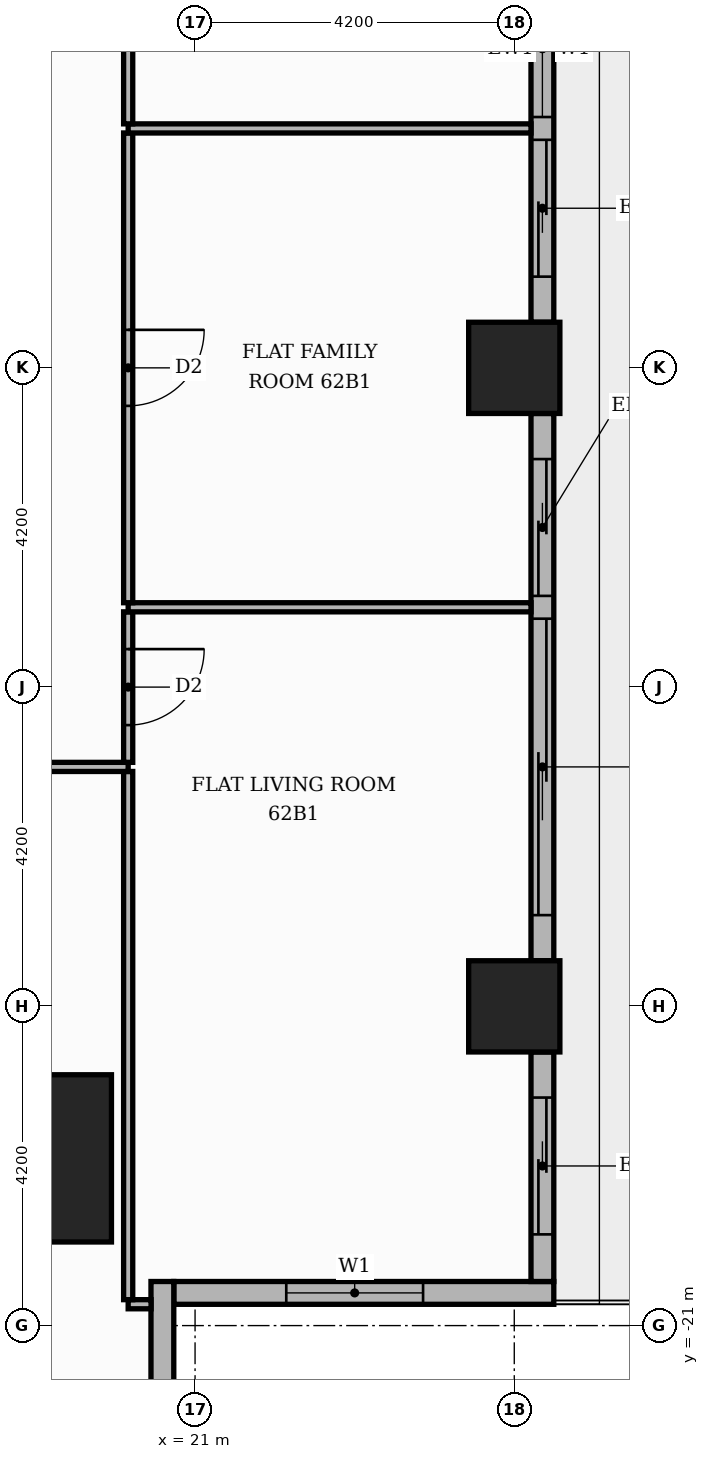
"""IFC4 building model, lengths in metres.
Left out: names, types, materials, properties, quantities, classifications, styles, units other than length and angle.
Written with IfcOpenShell. Run it as: python <this file> out.ifc"""

import sys

from ifc_helpers import new_model, si_unit, direction, frame, frame_2d, origin, origin_2d, place, context, subcontext, project, spatial, rectangle, extrude, element, fill, save


model = new_model("IFC4")
c1 = context("Model", 3, precision=1e-05, world=origin(), true_north=direction((0.0, 1.0)))
c2 = subcontext(c1, "Body", "Model", "MODEL_VIEW")
j1 = project(units=[si_unit("LENGTHUNIT", "METRE"), si_unit("PLANEANGLEUNIT", "RADIAN")], contexts=[c1])
p1 = place(None, origin())
s1 = spatial("IfcSite", under=j1, at=p1, CompositionType="ELEMENT")
p2 = place(p1, origin())
s2 = spatial("IfcBuilding", under=s1, at=p2, CompositionType="ELEMENT")
p3 = place(p2, frame((0.0, 0.0, 260.1)))
s3 = spatial("IfcBuildingStorey", under=s2, at=p3, CompositionType="ELEMENT", Elevation=260.1)
p4 = place(p3, frame((18.8, -18.8, 0.0), z_axis=(0.0, 0.0, 1.0), x_axis=(1.0, 0.0, 0.0)))
e1 = element("IfcColumn", 1, at=p4, inside=s3, PredefinedType="COLUMN", context=c2, shape_type="SweptSolid", body=[
    extrude(rectangle(XDim=2.2, YDim=2.2, at=origin_2d()), origin(), (0.0, 0.0, 1.0), 3.9),
])
for number, where, z_axis, x_axis in (
    (2, (25.2, -8.4, 0.0), (0.0, 0.0, 1.0), (1.0, 0.0, 0.0)),
    (3, (25.2, -16.8, 0.0), (0.0, 0.0, 1.0), (1.0, 0.0, 0.0)),
):
    element("IfcColumn", number, at=place(p3, frame(where, z_axis=z_axis, x_axis=x_axis)), inside=s3, PredefinedType="COLUMN", context=c2, shape_type="SweptSolid", body=[
        extrude(rectangle(XDim=1.2, YDim=1.2, at=origin_2d()), origin(), (0.0, 0.0, 1.0), 3.9),
    ])
p5 = place(p3, frame((20.72, -20.57, 0.0), z_axis=(0.0, 0.0, 1.0), x_axis=(1.0, 0.0, 0.0)))
e4 = element("IfcWall", 4, at=p5, inside=s3, PredefinedType="STANDARD", context=c2, shape_type="SweptSolid", body=[
    extrude(rectangle(XDim=5.0, YDim=0.3, at=frame_2d((2.5, 0.0))), origin(), (0.0, 0.0, 1.0), 3.48),
])
p6 = place(p5, frame((1.48, 0.0, 0.9)))
e5 = element("IfcOpeningElement", 5, at=p6, cuts=e4, PredefinedType="OPENING", context=c2, shape_type="SweptSolid", body=[
    extrude(rectangle(XDim=1.8, YDim=2.1, at=frame_2d((0.9, 1.05))), frame((0.0, 0.16, 0.0), z_axis=(0.0, -1.0, 0.0), x_axis=(1.0, 0.0, 0.0)), (0.0, 0.0, 1.0), 0.32),
])
p7 = place(p3, frame((25.57, -20.42, 0.0), z_axis=(0.0, 0.0, 1.0), x_axis=(0.0, 1.0, 0.0)))
e6 = element("IfcWall", 6, at=p7, inside=s3, PredefinedType="STANDARD", context=c2, shape_type="SweptSolid", body=[
    extrude(rectangle(XDim=3.02, YDim=0.3, at=frame_2d((1.51, 0.0))), origin(), (0.0, 0.0, 1.0), 3.48),
])
p8 = place(p7, frame((0.62, 0.0, 0.0)))
e7 = element("IfcOpeningElement", 7, at=p8, cuts=e6, PredefinedType="OPENING", context=c2, shape_type="SweptSolid", body=[
    extrude(rectangle(XDim=1.8, YDim=2.4, at=frame_2d((0.9, 1.2))), frame((0.0, 0.16, 0.0), z_axis=(0.0, -1.0, 0.0), x_axis=(1.0, 0.0, 0.0)), (0.0, 0.0, 1.0), 0.32),
])
p9 = place(p3, frame((25.57, -16.2, 0.0), z_axis=(0.0, 0.0, 1.0), x_axis=(0.0, 1.0, 0.0)))
e8 = element("IfcWall", 8, at=p9, inside=s3, PredefinedType="STANDARD", context=c2, shape_type="SweptSolid", body=[
    extrude(rectangle(XDim=7.2, YDim=0.3, at=frame_2d((3.6, 0.0))), origin(), (0.0, 0.0, 1.0), 3.48),
])
p10 = place(p9, frame((0.6, 0.0, 0.0)))
e9 = element("IfcOpeningElement", 9, at=p10, cuts=e8, PredefinedType="OPENING", context=c2, shape_type="SweptSolid", body=[
    extrude(rectangle(XDim=3.9, YDim=2.4, at=frame_2d((1.95, 1.2))), frame((0.0, 0.16, 0.0), z_axis=(0.0, -1.0, 0.0), x_axis=(1.0, 0.0, 0.0)), (0.0, 0.0, 1.0), 0.32),
])
p11 = place(p9, frame((4.8, 0.0, 0.0)))
e10 = element("IfcOpeningElement", 10, at=p11, cuts=e8, PredefinedType="OPENING", context=c2, shape_type="SweptSolid", body=[
    extrude(rectangle(XDim=1.8, YDim=2.4, at=frame_2d((0.9, 1.2))), frame((0.0, 0.16, 0.0), z_axis=(0.0, -1.0, 0.0), x_axis=(1.0, 0.0, 0.0)), (0.0, 0.0, 1.0), 0.32),
])
p12 = place(p3, frame((25.57, -7.8, 0.0), z_axis=(0.0, 0.0, 1.0), x_axis=(0.0, 1.0, 0.0)))
e11 = element("IfcWall", 11, at=p12, inside=s3, PredefinedType="STANDARD", context=c2, shape_type="SweptSolid", body=[
    extrude(rectangle(XDim=7.2, YDim=0.3, at=frame_2d((3.6, 0.0))), origin(), (0.0, 0.0, 1.0), 3.48),
])
p13 = place(p12, frame((0.6, 0.0, 0.0)))
e12 = element("IfcOpeningElement", 12, at=p13, cuts=e11, PredefinedType="OPENING", context=c2, shape_type="SweptSolid", body=[
    extrude(rectangle(XDim=1.8, YDim=2.4, at=frame_2d((0.9, 1.2))), frame((0.0, 0.16, 0.0), z_axis=(0.0, -1.0, 0.0), x_axis=(1.0, 0.0, 0.0)), (0.0, 0.0, 1.0), 0.32),
])
p14 = place(p12, frame((2.7, 0.0, 0.9)))
e13 = element("IfcOpeningElement", 13, at=p14, cuts=e11, PredefinedType="OPENING", context=c2, shape_type="SweptSolid", body=[
    extrude(rectangle(XDim=1.8, YDim=2.1, at=frame_2d((0.9, 1.05))), frame((0.0, 0.16, 0.0), z_axis=(0.0, -1.0, 0.0), x_axis=(1.0, 0.0, 0.0)), (0.0, 0.0, 1.0), 0.32),
])
p15 = place(p12, frame((4.8, 0.0, 0.0)))
e14 = element("IfcOpeningElement", 14, at=p15, cuts=e11, PredefinedType="OPENING", context=c2, shape_type="SweptSolid", body=[
    extrude(rectangle(XDim=1.8, YDim=2.4, at=frame_2d((0.9, 1.2))), frame((0.0, 0.16, 0.0), z_axis=(0.0, -1.0, 0.0), x_axis=(1.0, 0.0, 0.0)), (0.0, 0.0, 1.0), 0.32),
])
p16 = place(p3, frame((20.57, -25.42, 0.0), z_axis=(0.0, 0.0, 1.0), x_axis=(0.0, 1.0, 0.0)))
e15 = element("IfcWall", 15, at=p16, inside=s3, PredefinedType="STANDARD", context=c2, shape_type="SweptSolid", body=[
    extrude(rectangle(XDim=5.0, YDim=0.3, at=frame_2d((2.5, 0.0))), origin(), (0.0, 0.0, 1.0), 3.48),
])
p17 = place(p16, frame((1.42, 0.0, 0.9)))
e16 = element("IfcOpeningElement", 16, at=p17, cuts=e15, PredefinedType="OPENING", context=c2, shape_type="SweptSolid", body=[
    extrude(rectangle(XDim=1.8, YDim=2.1, at=frame_2d((0.9, 1.05))), frame((0.0, 0.16, 0.0), z_axis=(0.0, -1.0, 0.0), x_axis=(1.0, 0.0, 0.0)), (0.0, 0.0, 1.0), 0.32),
])
p18 = place(p3, frame((20.12, -20.719, 0.0), z_axis=(0.0, 0.0, 1.0), x_axis=(1.0, 0.0, 0.0)))
e17 = element("IfcWall", 17, at=p18, inside=s3, PredefinedType="PARTITIONING", context=c2, shape_type="SweptSolid", body=[
    extrude(rectangle(XDim=0.301, YDim=0.12, at=frame_2d((0.15, 0.0))), origin(), (0.0, 0.0, 1.0), 3.48),
])
p19 = place(p3, frame((20.12, -20.659, 0.0), z_axis=(0.0, 0.0, 1.0), x_axis=(0.0, 1.0, 0.0)))
e18 = element("IfcWall", 18, at=p19, inside=s3, PredefinedType="PARTITIONING", context=c2, shape_type="SweptSolid", body=[
    extrude(rectangle(XDim=6.949, YDim=0.12, at=frame_2d((3.475, 0.0))), origin(), (0.0, 0.0, 1.0), 3.48),
])
p20 = place(p3, frame((13.65, -13.65, 0.0), z_axis=(0.0, 0.0, 1.0), x_axis=(1.0, 0.0, 0.0)))
e19 = element("IfcWall", 19, at=p20, inside=s3, PredefinedType="PARTITIONING", context=c2, shape_type="SweptSolid", body=[
    extrude(rectangle(XDim=6.47, YDim=0.12, at=frame_2d((3.235, 0.0))), origin(), (0.0, 0.0, 1.0), 3.48),
])
p21 = place(p20, frame((2.785, 0.0, 0.0)))
e20 = element("IfcOpeningElement", 20, at=p21, cuts=e19, PredefinedType="OPENING", context=c2, shape_type="SweptSolid", body=[
    extrude(rectangle(XDim=0.9, YDim=2.1, at=frame_2d((0.45, 1.05))), frame((0.0, 0.07, 0.0), z_axis=(0.0, -1.0, 0.0), x_axis=(1.0, 0.0, 0.0)), (0.0, 0.0, 1.0), 0.14),
])
p22 = place(p3, frame((20.12, -13.59, 0.0), z_axis=(0.0, 0.0, 1.0), x_axis=(0.0, 1.0, 0.0)))
e21 = element("IfcWall", 21, at=p22, inside=s3, PredefinedType="PARTITIONING", context=c2, shape_type="SweptSolid", body=[
    extrude(rectangle(XDim=1.98, YDim=0.12, at=frame_2d((0.99, 0.0))), origin(), (0.0, 0.0, 1.0), 3.48),
])
p23 = place(p22, frame((0.49, 0.0, 0.0)))
e22 = element("IfcOpeningElement", 22, at=p23, cuts=e21, PredefinedType="OPENING", context=c2, shape_type="SweptSolid", body=[
    extrude(rectangle(XDim=1.0, YDim=2.1, at=frame_2d((0.5, 1.05))), frame((0.0, 0.07, 0.0), z_axis=(0.0, -1.0, 0.0), x_axis=(1.0, 0.0, 0.0)), (0.0, 0.0, 1.0), 0.14),
])
p24 = place(p3, frame((20.12, -11.55, 0.0), z_axis=(0.0, 0.0, 1.0), x_axis=(1.0, 0.0, 0.0)))
e23 = element("IfcWall", 23, at=p24, inside=s3, PredefinedType="PARTITIONING", context=c2, shape_type="SweptSolid", body=[
    extrude(rectangle(XDim=5.3, YDim=0.12, at=frame_2d((2.65, 0.0))), origin(), (0.0, 0.0, 1.0), 3.48),
])
p25 = place(p3, frame((20.12, -11.49, 0.0), z_axis=(0.0, 0.0, 1.0), x_axis=(0.0, 1.0, 0.0)))
e24 = element("IfcWall", 24, at=p25, inside=s3, PredefinedType="PARTITIONING", context=c2, shape_type="SweptSolid", body=[
    extrude(rectangle(XDim=6.18, YDim=0.12, at=frame_2d((3.09, 0.0))), origin(), (0.0, 0.0, 1.0), 3.48),
])
p26 = place(p25, frame((2.59, 0.0, 0.0)))
e25 = element("IfcOpeningElement", 25, at=p26, cuts=e24, PredefinedType="OPENING", context=c2, shape_type="SweptSolid", body=[
    extrude(rectangle(XDim=1.0, YDim=2.1, at=frame_2d((0.5, 1.05))), frame((0.0, 0.07, 0.0), z_axis=(0.0, -1.0, 0.0), x_axis=(1.0, 0.0, 0.0)), (0.0, 0.0, 1.0), 0.14),
])
p27 = place(p3, frame((20.12, -5.25, 0.0), z_axis=(0.0, 0.0, 1.0), x_axis=(1.0, 0.0, 0.0)))
e26 = element("IfcWall", 26, at=p27, inside=s3, PredefinedType="PARTITIONING", context=c2, shape_type="SweptSolid", body=[
    extrude(rectangle(XDim=5.3, YDim=0.12, at=frame_2d((2.65, 0.0))), origin(), (0.0, 0.0, 1.0), 3.48),
])
p28 = place(p3, frame((20.12, -5.19, 0.0), z_axis=(0.0, 0.0, 1.0), x_axis=(0.0, 1.0, 0.0)))
e27 = element("IfcWall", 27, at=p28, inside=s3, PredefinedType="PARTITIONING", context=c2, shape_type="SweptSolid", body=[
    extrude(rectangle(XDim=8.28, YDim=0.12, at=frame_2d((4.14, 0.0))), origin(), (0.0, 0.0, 1.0), 3.48),
])
p29 = place(p28, frame((3.69, 0.0, 0.0)))
e28 = element("IfcOpeningElement", 28, at=p29, cuts=e27, PredefinedType="OPENING", context=c2, shape_type="SweptSolid", body=[
    extrude(rectangle(XDim=0.9, YDim=2.1, at=frame_2d((0.45, 1.05))), frame((0.0, 0.07, 0.0), z_axis=(0.0, -1.0, 0.0), x_axis=(1.0, 0.0, 0.0)), (0.0, 0.0, 1.0), 0.14),
])
p30 = place(p6, origin())
e29 = element("IfcWindow", 29, at=p30, inside=s3, PartitioningType="SINGLE_PANEL", PredefinedType="WINDOW", context=c2, shape_type="SweptSolid", body=[
    extrude(rectangle(XDim=1.8, YDim=2.1, at=frame_2d((0.9, 1.05))), frame((0.0, 0.03, 0.0), z_axis=(0.0, -1.0, 0.0), x_axis=(1.0, 0.0, 0.0)), (0.0, 0.0, 1.0), 0.06),
])
fill(e5, e29)
p31 = place(p8, origin())
e30 = element("IfcDoor", 30, at=p31, inside=s3, OperationType="SLIDING_TO_RIGHT", PredefinedType="DOOR", context=c2, shape_type="SweptSolid", body=[
    extrude(rectangle(XDim=1.8, YDim=2.4, at=frame_2d((0.9, 1.2))), frame((0.0, 0.025, 0.0), z_axis=(0.0, -1.0, 0.0), x_axis=(1.0, 0.0, 0.0)), (0.0, 0.0, 1.0), 0.05),
])
fill(e7, e30)
p32 = place(p10, origin())
e31 = element("IfcDoor", 31, at=p32, inside=s3, OperationType="SLIDING_TO_LEFT", PredefinedType="DOOR", context=c2, shape_type="SweptSolid", body=[
    extrude(rectangle(XDim=3.9, YDim=2.4, at=frame_2d((1.95, 1.2))), frame((0.0, 0.025, 0.0), z_axis=(0.0, -1.0, 0.0), x_axis=(1.0, 0.0, 0.0)), (0.0, 0.0, 1.0), 0.05),
])
fill(e9, e31)
p33 = place(p11, origin())
e32 = element("IfcDoor", 32, at=p33, inside=s3, OperationType="SLIDING_TO_RIGHT", PredefinedType="DOOR", context=c2, shape_type="SweptSolid", body=[
    extrude(rectangle(XDim=1.8, YDim=2.4, at=frame_2d((0.9, 1.2))), frame((0.0, 0.025, 0.0), z_axis=(0.0, -1.0, 0.0), x_axis=(1.0, 0.0, 0.0)), (0.0, 0.0, 1.0), 0.05),
])
fill(e10, e32)
p34 = place(p13, origin())
e33 = element("IfcDoor", 33, at=p34, inside=s3, OperationType="SLIDING_TO_LEFT", PredefinedType="DOOR", context=c2, shape_type="SweptSolid", body=[
    extrude(rectangle(XDim=1.8, YDim=2.4, at=frame_2d((0.9, 1.2))), frame((0.0, 0.025, 0.0), z_axis=(0.0, -1.0, 0.0), x_axis=(1.0, 0.0, 0.0)), (0.0, 0.0, 1.0), 0.05),
])
fill(e12, e33)
p35 = place(p14, origin())
e34 = element("IfcWindow", 34, at=p35, inside=s3, PartitioningType="SINGLE_PANEL", PredefinedType="WINDOW", context=c2, shape_type="SweptSolid", body=[
    extrude(rectangle(XDim=1.8, YDim=2.1, at=frame_2d((0.9, 1.05))), frame((0.0, 0.03, 0.0), z_axis=(0.0, -1.0, 0.0), x_axis=(1.0, 0.0, 0.0)), (0.0, 0.0, 1.0), 0.06),
])
fill(e13, e34)
p36 = place(p23, frame((1.0, 0.0, 0.0), z_axis=(0.0, 0.0, 1.0), x_axis=(-1.0, 0.0, 0.0)))
e35 = element("IfcDoor", 35, at=p36, inside=s3, OperationType="SINGLE_SWING_RIGHT", PredefinedType="DOOR", context=c2, shape_type="SweptSolid", body=[
    extrude(rectangle(XDim=1.0, YDim=2.1, at=frame_2d((0.5, 1.05))), frame((0.0, 0.025, 0.0), z_axis=(0.0, -1.0, 0.0), x_axis=(1.0, 0.0, 0.0)), (0.0, 0.0, 1.0), 0.05),
])
fill(e22, e35)
p37 = place(p26, frame((1.0, 0.0, 0.0), z_axis=(0.0, 0.0, 1.0), x_axis=(-1.0, 0.0, 0.0)))
e36 = element("IfcDoor", 36, at=p37, inside=s3, OperationType="SINGLE_SWING_RIGHT", PredefinedType="DOOR", context=c2, shape_type="SweptSolid", body=[
    extrude(rectangle(XDim=1.0, YDim=2.1, at=frame_2d((0.5, 1.05))), frame((0.0, 0.025, 0.0), z_axis=(0.0, -1.0, 0.0), x_axis=(1.0, 0.0, 0.0)), (0.0, 0.0, 1.0), 0.05),
])
fill(e25, e36)
save(model, sys.argv[1])
